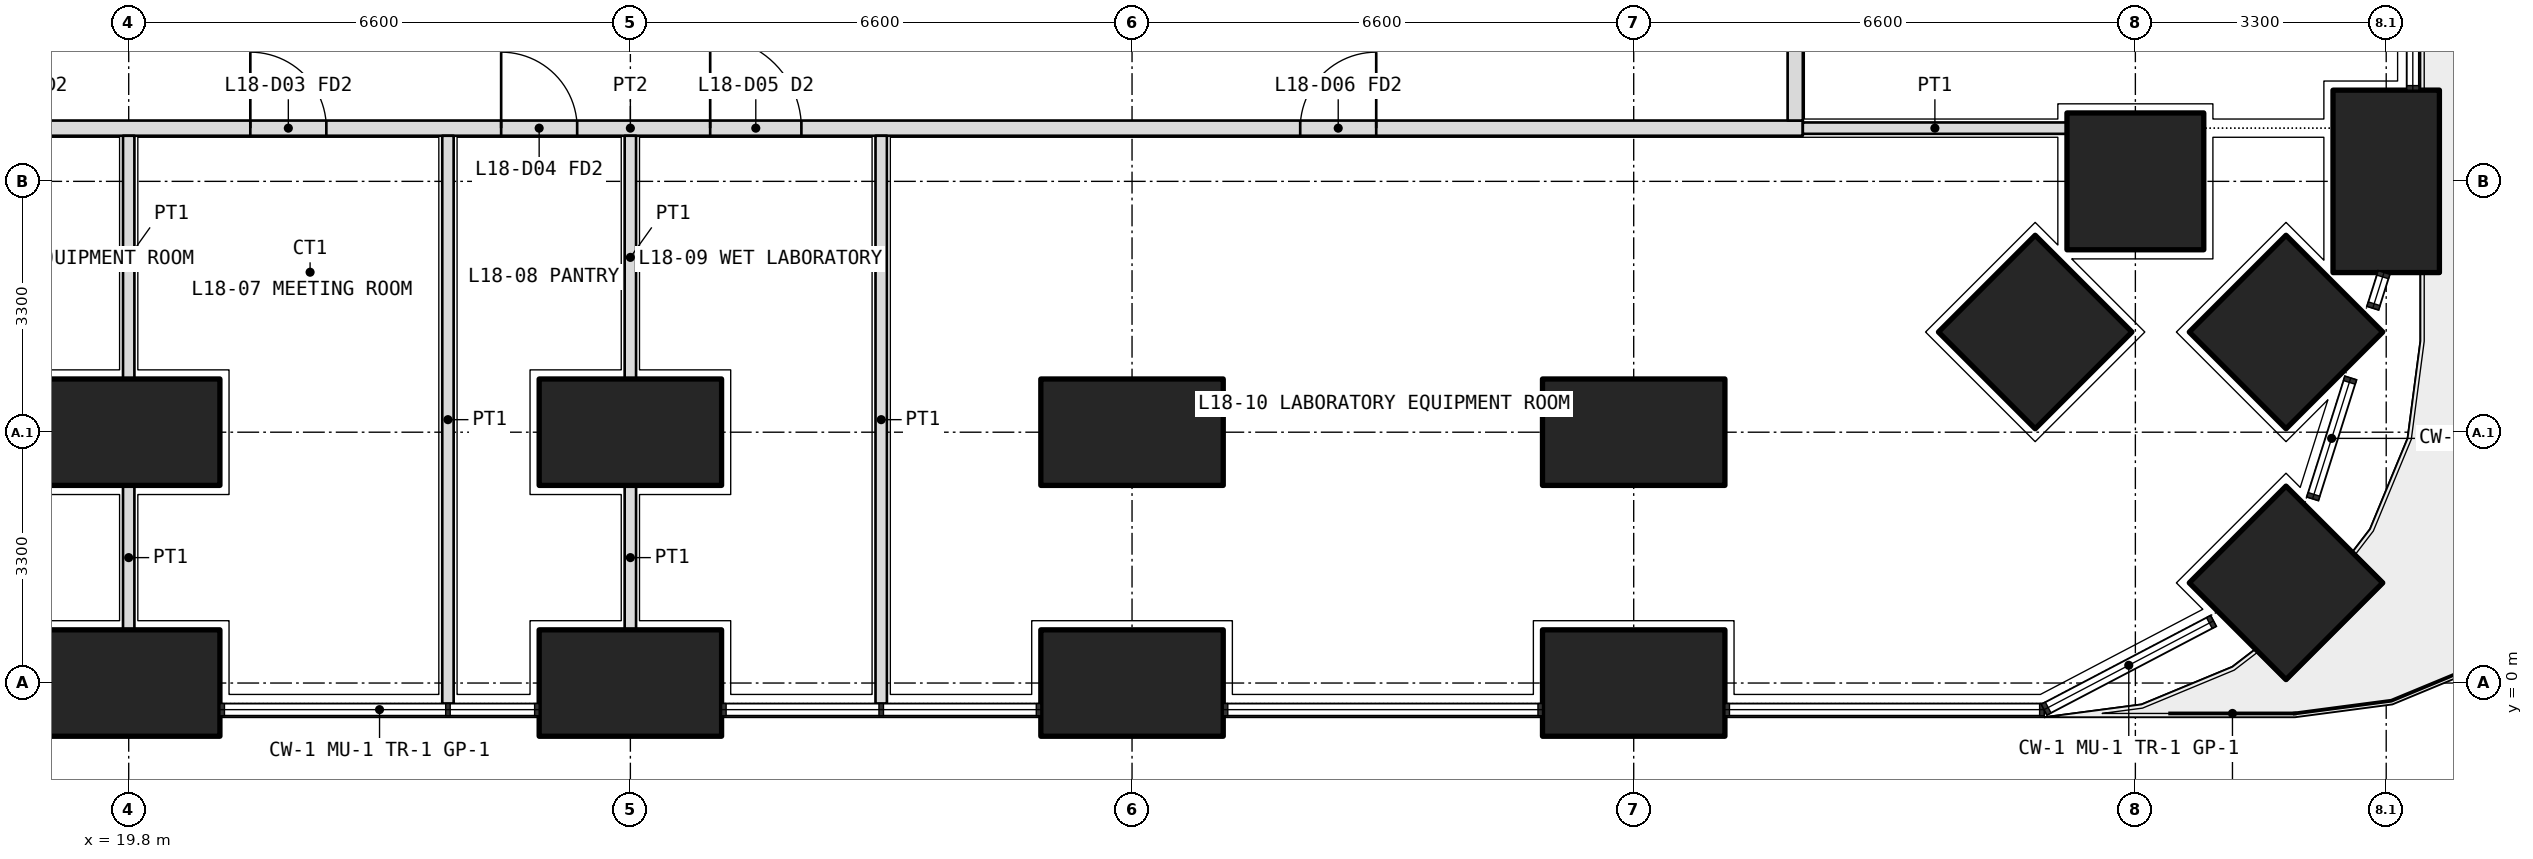
"""IFC4 building model, lengths in metres.
Left out: names, types, materials, properties, quantities, classifications, styles, units other than length and angle.
Written with IfcOpenShell. Run it as: python <this file> out.ifc"""

import sys

from ifc_helpers import new_model, si_unit, direction, frame, frame_2d, origin, origin_2d, place, context, subcontext, project, spatial, rectangle, extrude, element, fill, save


model = new_model("IFC4")
c1 = context("Model", 3, precision=1e-05, world=origin(), true_north=direction((0.0, 1.0)))
c2 = subcontext(c1, "Body", "Model", "MODEL_VIEW")
j1 = project(units=[si_unit("LENGTHUNIT", "METRE"), si_unit("PLANEANGLEUNIT", "RADIAN")], contexts=[c1])
p1 = place(None, origin())
s1 = spatial("IfcSite", under=j1, at=p1, CompositionType="ELEMENT")
p2 = place(p1, origin())
s2 = spatial("IfcBuilding", under=s1, at=p2, CompositionType="ELEMENT")
p3 = place(p2, frame((0.0, 0.0, 82.2)))
s3 = spatial("IfcBuildingStorey", under=s2, at=p3, CompositionType="ELEMENT", Elevation=82.2)
p4 = place(p3, frame((48.182, 1.318, 0.0), z_axis=(0.0, 0.0, 1.0), x_axis=(0.707106781187, 0.707106781187, 0.0)))
e1 = element("IfcColumn", 1, at=p4, inside=s3, PredefinedType="COLUMN", context=c2, shape_type="SweptSolid", body=[
    extrude(rectangle(XDim=1.8, YDim=1.8, at=origin_2d()), origin(), (0.0, 0.0, 1.0), 4.2),
])
for number, where, z_axis, x_axis in (
    (2, (19.8, 0.0, 0.0), (0.0, 0.0, 1.0), (1.0, 0.0, 0.0)),
    (3, (26.4, 0.0, 0.0), (0.0, 0.0, 1.0), (1.0, 0.0, 0.0)),
    (4, (33.0, 0.0, 0.0), (0.0, 0.0, 1.0), (1.0, 0.0, 0.0)),
    (5, (39.6, 0.0, 0.0), (0.0, 0.0, 1.0), (1.0, 0.0, 0.0)),
    (6, (49.5, 6.6, 0.0), (0.0, 0.0, 1.0), (0.0, 1.0, 0.0)),
):
    element("IfcColumn", number, at=place(p3, frame(where, z_axis=z_axis, x_axis=x_axis)), inside=s3, PredefinedType="COLUMN", context=c2, shape_type="SweptSolid", body=[
        extrude(rectangle(XDim=2.4, YDim=1.4, at=origin_2d()), origin(), (0.0, 0.0, 1.0), 4.2),
    ])
for number, where, z_axis, x_axis in (
    (7, (46.2, 6.6, 0.0), (0.0, 0.0, 1.0), (1.0, 0.0, 0.0)),
    (8, (48.182, 4.618, 0.0), (0.0, 0.0, 1.0), (0.707, 0.707, 0.0)),
):
    element("IfcColumn", number, at=place(p3, frame(where, z_axis=z_axis, x_axis=x_axis)), inside=s3, PredefinedType="COLUMN", context=c2, shape_type="SweptSolid", body=[
        extrude(rectangle(XDim=1.8, YDim=1.8, at=origin_2d()), origin(), (0.0, 0.0, 1.0), 4.2),
    ])
for number, where, z_axis, x_axis in (
    (9, (19.8, 3.3, 0.0), (0.0, 0.0, 1.0), (1.0, 0.0, 0.0)),
    (10, (26.4, 3.3, 0.0), (0.0, 0.0, 1.0), (1.0, 0.0, 0.0)),
    (11, (33.0, 3.3, 0.0), (0.0, 0.0, 1.0), (1.0, 0.0, 0.0)),
    (12, (39.6, 3.3, 0.0), (0.0, 0.0, 1.0), (1.0, 0.0, 0.0)),
):
    element("IfcColumn", number, at=place(p3, frame(where, z_axis=z_axis, x_axis=x_axis)), inside=s3, PredefinedType="COLUMN", context=c2, shape_type="SweptSolid", body=[
        extrude(rectangle(XDim=2.4, YDim=1.4, at=origin_2d()), origin(), (0.0, 0.0, 1.0), 4.2),
    ])
p5 = place(p3, frame((44.882, 4.618, 0.0), z_axis=(0.0, 0.0, 1.0), x_axis=(0.707106781187, 0.707106781187, 0.0)))
e13 = element("IfcColumn", 13, at=p5, inside=s3, PredefinedType="COLUMN", context=c2, shape_type="SweptSolid", body=[
    extrude(rectangle(XDim=1.8, YDim=1.8, at=origin_2d()), origin(), (0.0, 0.0, 1.0), 4.2),
])
p6 = place(p3, frame((10.975, 7.3, 0.0), z_axis=(0.0, 0.0, 1.0), x_axis=(1.0, 0.0, 0.0)))
e14 = element("IfcWall", 14, at=p6, inside=s3, PredefinedType="PARTITIONING", context=c2, shape_type="SweptSolid", body=[
    extrude(rectangle(XDim=30.85, YDim=0.2, at=frame_2d((15.425, 0.0))), origin(), (0.0, 0.0, 1.0), 2.85),
])
p7 = place(p6, frame((2.212, 0.0, 0.0)))
e15 = element("IfcOpeningElement", 15, at=p7, cuts=e14, PredefinedType="OPENING", context=c2, shape_type="SweptSolid", body=[
    extrude(rectangle(XDim=1.2, YDim=2.1, at=frame_2d((0.6, 1.05))), frame((0.0, 0.11, 0.0), z_axis=(0.0, -1.0, 0.0), x_axis=(1.0, 0.0, 0.0)), (0.0, 0.0, 1.0), 0.22),
])
p8 = place(p6, frame((6.675, 0.0, 0.0)))
e16 = element("IfcOpeningElement", 16, at=p8, cuts=e14, PredefinedType="OPENING", context=c2, shape_type="SweptSolid", body=[
    extrude(rectangle(XDim=1.0, YDim=2.1, at=frame_2d((0.5, 1.05))), frame((0.0, 0.11, 0.0), z_axis=(0.0, -1.0, 0.0), x_axis=(1.0, 0.0, 0.0)), (0.0, 0.0, 1.0), 0.22),
])
p9 = place(p6, frame((10.425, 0.0, 0.0)))
e17 = element("IfcOpeningElement", 17, at=p9, cuts=e14, PredefinedType="OPENING", context=c2, shape_type="SweptSolid", body=[
    extrude(rectangle(XDim=1.0, YDim=2.1, at=frame_2d((0.5, 1.05))), frame((0.0, 0.11, 0.0), z_axis=(0.0, -1.0, 0.0), x_axis=(1.0, 0.0, 0.0)), (0.0, 0.0, 1.0), 0.22),
])
p10 = place(p6, frame((13.725, 0.0, 0.0)))
e18 = element("IfcOpeningElement", 18, at=p10, cuts=e14, PredefinedType="OPENING", context=c2, shape_type="SweptSolid", body=[
    extrude(rectangle(XDim=1.0, YDim=2.1, at=frame_2d((0.5, 1.05))), frame((0.0, 0.11, 0.0), z_axis=(0.0, -1.0, 0.0), x_axis=(1.0, 0.0, 0.0)), (0.0, 0.0, 1.0), 0.22),
])
p11 = place(p6, frame((16.475, 0.0, 0.0)))
e19 = element("IfcOpeningElement", 19, at=p11, cuts=e14, PredefinedType="OPENING", context=c2, shape_type="SweptSolid", body=[
    extrude(rectangle(XDim=1.2, YDim=2.1, at=frame_2d((0.6, 1.05))), frame((0.0, 0.11, 0.0), z_axis=(0.0, -1.0, 0.0), x_axis=(1.0, 0.0, 0.0)), (0.0, 0.0, 1.0), 0.22),
])
p12 = place(p6, frame((24.238, 0.0, 0.0)))
e20 = element("IfcOpeningElement", 20, at=p12, cuts=e14, PredefinedType="OPENING", context=c2, shape_type="SweptSolid", body=[
    extrude(rectangle(XDim=1.0, YDim=2.1, at=frame_2d((0.5, 1.05))), frame((0.0, 0.11, 0.0), z_axis=(0.0, -1.0, 0.0), x_axis=(1.0, 0.0, 0.0)), (0.0, 0.0, 1.0), 0.22),
])
p13 = place(p3, frame((41.725, 7.4, 0.0), z_axis=(0.0, 0.0, 1.0), x_axis=(0.0, 1.0, 0.0)))
e21 = element("IfcWall", 21, at=p13, inside=s3, PredefinedType="PARTITIONING", context=c2, shape_type="SweptSolid", body=[
    extrude(rectangle(XDim=27.625, YDim=0.2, at=frame_2d((13.812, 0.0))), origin(), (0.0, 0.0, 1.0), 2.85),
])
p14 = place(p13, frame((4.0, 0.0, 0.0)))
e22 = element("IfcOpeningElement", 22, at=p14, cuts=e21, PredefinedType="OPENING", context=c2, shape_type="SweptSolid", body=[
    extrude(rectangle(XDim=1.0, YDim=2.1, at=frame_2d((0.5, 1.05))), frame((0.0, 0.11, 0.0), z_axis=(0.0, -1.0, 0.0), x_axis=(1.0, 0.0, 0.0)), (0.0, 0.0, 1.0), 0.22),
])
p15 = place(p13, frame((10.25, 0.0, 0.0)))
e23 = element("IfcOpeningElement", 23, at=p15, cuts=e21, PredefinedType="OPENING", context=c2, shape_type="SweptSolid", body=[
    extrude(rectangle(XDim=1.0, YDim=2.1, at=frame_2d((0.5, 1.05))), frame((0.0, 0.11, 0.0), z_axis=(0.0, -1.0, 0.0), x_axis=(1.0, 0.0, 0.0)), (0.0, 0.0, 1.0), 0.22),
])
p16 = place(p13, frame((13.5, 0.0, 0.0)))
e24 = element("IfcOpeningElement", 24, at=p16, cuts=e21, PredefinedType="OPENING", context=c2, shape_type="SweptSolid", body=[
    extrude(rectangle(XDim=1.0, YDim=2.1, at=frame_2d((0.5, 1.05))), frame((0.0, 0.11, 0.0), z_axis=(0.0, -1.0, 0.0), x_axis=(1.0, 0.0, 0.0)), (0.0, 0.0, 1.0), 0.22),
])
p17 = place(p13, frame((16.85, 0.0, 0.0)))
e25 = element("IfcOpeningElement", 25, at=p17, cuts=e21, PredefinedType="OPENING", context=c2, shape_type="SweptSolid", body=[
    extrude(rectangle(XDim=0.9, YDim=2.1, at=frame_2d((0.45, 1.05))), frame((0.0, 0.11, 0.0), z_axis=(0.0, -1.0, 0.0), x_axis=(1.0, 0.0, 0.0)), (0.0, 0.0, 1.0), 0.22),
])
p18 = place(p13, frame((20.15, 0.0, 0.0)))
e26 = element("IfcOpeningElement", 26, at=p18, cuts=e21, PredefinedType="OPENING", context=c2, shape_type="SweptSolid", body=[
    extrude(rectangle(XDim=1.0, YDim=2.1, at=frame_2d((0.5, 1.05))), frame((0.0, 0.11, 0.0), z_axis=(0.0, -1.0, 0.0), x_axis=(1.0, 0.0, 0.0)), (0.0, 0.0, 1.0), 0.22),
])
p19 = place(p13, frame((24.512, 0.0, 0.0)))
e27 = element("IfcOpeningElement", 27, at=p19, cuts=e21, PredefinedType="OPENING", context=c2, shape_type="SweptSolid", body=[
    extrude(rectangle(XDim=1.0, YDim=2.1, at=frame_2d((0.5, 1.05))), frame((0.0, 0.11, 0.0), z_axis=(0.0, -1.0, 0.0), x_axis=(1.0, 0.0, 0.0)), (0.0, 0.0, 1.0), 0.22),
])
p20 = place(p3, frame((45.3, 7.3, 0.0), z_axis=(0.0, 0.0, 1.0), x_axis=(-1.0, 0.0, 0.0)))
e28 = element("IfcWall", 28, at=p20, inside=s3, PredefinedType="PARTITIONING", context=c2, shape_type="SweptSolid", body=[
    extrude(rectangle(XDim=3.475, YDim=0.15, at=frame_2d((1.738, 0.0))), origin(), (0.0, 0.0, 1.0), 2.85),
])
p21 = place(p3, frame((24.0, -0.27, 0.0), z_axis=(0.0, 0.0, 1.0), x_axis=(0.0, 1.0, 0.0)))
e29 = element("IfcWall", 29, at=p21, inside=s3, PredefinedType="PARTITIONING", context=c2, shape_type="SweptSolid", body=[
    extrude(rectangle(XDim=7.47, YDim=0.15, at=frame_2d((3.735, 0.0))), origin(), (0.0, 0.0, 1.0), 2.7),
])
p22 = place(p3, frame((26.4, 0.7, 0.0), z_axis=(0.0, 0.0, 1.0), x_axis=(0.0, 1.0, 0.0)))
e30 = element("IfcWall", 30, at=p22, inside=s3, PredefinedType="PARTITIONING", context=c2, shape_type="SweptSolid", body=[
    extrude(rectangle(XDim=1.9, YDim=0.15, at=frame_2d((0.95, 0.0))), origin(), (0.0, 0.0, 1.0), 2.85),
])
p23 = place(p3, frame((26.4, 4.0, 0.0), z_axis=(0.0, 0.0, 1.0), x_axis=(0.0, 1.0, 0.0)))
e31 = element("IfcWall", 31, at=p23, inside=s3, PredefinedType="PARTITIONING", context=c2, shape_type="SweptSolid", body=[
    extrude(rectangle(XDim=3.2, YDim=0.15, at=frame_2d((1.6, 0.0))), origin(), (0.0, 0.0, 1.0), 2.85),
])
p24 = place(p3, frame((19.8, 0.7, 0.0), z_axis=(0.0, 0.0, 1.0), x_axis=(0.0, 1.0, 0.0)))
e32 = element("IfcWall", 32, at=p24, inside=s3, PredefinedType="PARTITIONING", context=c2, shape_type="SweptSolid", body=[
    extrude(rectangle(XDim=1.9, YDim=0.15, at=frame_2d((0.95, 0.0))), origin(), (0.0, 0.0, 1.0), 2.85),
])
p25 = place(p3, frame((19.8, 4.0, 0.0), z_axis=(0.0, 0.0, 1.0), x_axis=(0.0, 1.0, 0.0)))
e33 = element("IfcWall", 33, at=p25, inside=s3, PredefinedType="PARTITIONING", context=c2, shape_type="SweptSolid", body=[
    extrude(rectangle(XDim=3.2, YDim=0.15, at=frame_2d((1.6, 0.0))), origin(), (0.0, 0.0, 1.0), 2.85),
])
p26 = place(p3, frame((29.7, -0.27, 0.0), z_axis=(0.0, 0.0, 1.0), x_axis=(0.0, 1.0, 0.0)))
e34 = element("IfcWall", 34, at=p26, inside=s3, PredefinedType="PARTITIONING", context=c2, shape_type="SweptSolid", body=[
    extrude(rectangle(XDim=7.47, YDim=0.15, at=frame_2d((3.735, 0.0))), origin(), (0.0, 0.0, 1.0), 2.7),
])
p27 = place(p9, origin())
e35 = element("IfcDoor", 35, at=p27, inside=s3, OperationType="SINGLE_SWING_LEFT", PredefinedType="DOOR", context=c2, shape_type="SweptSolid", body=[
    extrude(rectangle(XDim=1.0, YDim=2.1, at=frame_2d((0.5, 1.05))), frame((0.0, 0.025, 0.0), z_axis=(0.0, -1.0, 0.0), x_axis=(1.0, 0.0, 0.0)), (0.0, 0.0, 1.0), 0.05),
])
fill(e17, e35)
p28 = place(p10, origin())
e36 = element("IfcDoor", 36, at=p28, inside=s3, OperationType="SINGLE_SWING_LEFT", PredefinedType="DOOR", context=c2, shape_type="SweptSolid", body=[
    extrude(rectangle(XDim=1.0, YDim=2.1, at=frame_2d((0.5, 1.05))), frame((0.0, 0.025, 0.0), z_axis=(0.0, -1.0, 0.0), x_axis=(1.0, 0.0, 0.0)), (0.0, 0.0, 1.0), 0.05),
])
fill(e18, e36)
p29 = place(p11, origin())
e37 = element("IfcDoor", 37, at=p29, inside=s3, OperationType="DOUBLE_DOOR_SINGLE_SWING", PredefinedType="DOOR", context=c2, shape_type="SweptSolid", body=[
    extrude(rectangle(XDim=1.2, YDim=2.1, at=frame_2d((0.6, 1.05))), frame((0.0, 0.025, 0.0), z_axis=(0.0, -1.0, 0.0), x_axis=(1.0, 0.0, 0.0)), (0.0, 0.0, 1.0), 0.05),
])
fill(e19, e37)
p30 = place(p12, origin())
e38 = element("IfcDoor", 38, at=p30, inside=s3, OperationType="SINGLE_SWING_RIGHT", PredefinedType="DOOR", context=c2, shape_type="SweptSolid", body=[
    extrude(rectangle(XDim=1.0, YDim=2.1, at=frame_2d((0.5, 1.05))), frame((0.0, 0.025, 0.0), z_axis=(0.0, -1.0, 0.0), x_axis=(1.0, 0.0, 0.0)), (0.0, 0.0, 1.0), 0.05),
])
fill(e20, e38)
save(model, sys.argv[1])
